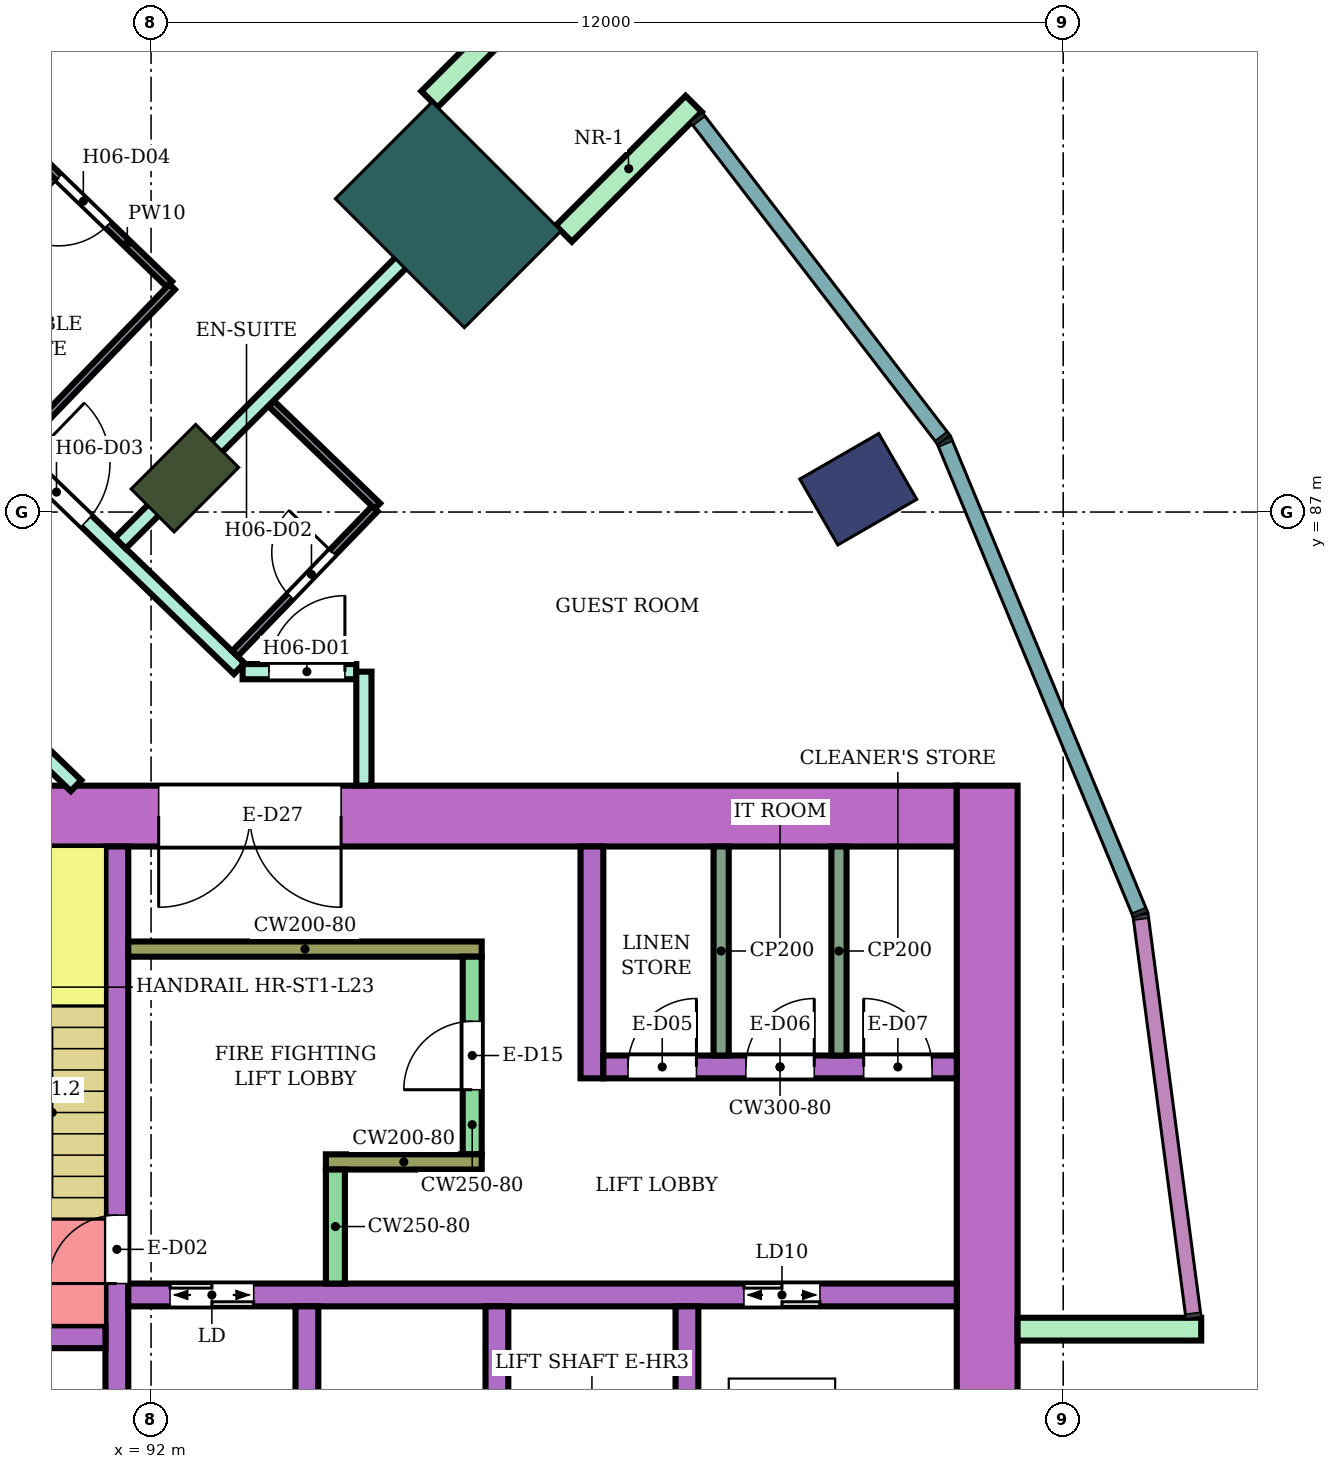
"""IFC4 building model, lengths in metres.
Left out: names, types, materials, properties, quantities, classifications, styles, units other than length and angle.
Written with IfcOpenShell. Run it as: python <this file> out.ifc"""

import sys

from ifc_helpers import new_model, si_unit, direction, frame, frame_2d, origin, origin_2d, place, context, subcontext, project, spatial, rectangle, extrude, element, fill, save


model = new_model("IFC4")
c1 = context("Model", 3, precision=1e-05, world=origin(), true_north=direction((0.0, 1.0)))
c2 = subcontext(c1, "Body", "Model", "MODEL_VIEW")
j1 = project(units=[si_unit("LENGTHUNIT", "METRE"), si_unit("PLANEANGLEUNIT", "RADIAN")], contexts=[c1])
p1 = place(None, origin())
s1 = spatial("IfcSite", under=j1, at=p1, CompositionType="ELEMENT")
p2 = place(p1, origin())
s2 = spatial("IfcBuilding", under=s1, at=p2, CompositionType="ELEMENT")
p3 = place(p2, frame((0.0, 0.0, 101.4)))
s3 = spatial("IfcBuildingStorey", under=s2, at=p3, CompositionType="ELEMENT", Elevation=101.4)
p4 = place(p3, frame((101.304, 87.3, 0.0), z_axis=(0.0, 0.0, 1.0), x_axis=(0.866025403784, 0.5, 0.0)))
e1 = element("IfcColumn", 1, at=p4, inside=s3, PredefinedType="COLUMN", context=c2, shape_type="SweptSolid", body=[
    extrude(rectangle(XDim=1.2, YDim=1.0, at=origin_2d()), origin(), (0.0, 0.0, 1.0), 3.8),
])
p5 = place(p3, frame((92.445, 87.445, 0.0), z_axis=(0.0, 0.0, 1.0), x_axis=(0.707106781187, 0.707106781187, 0.0)))
e2 = element("IfcColumn", 2, at=p5, inside=s3, PredefinedType="COLUMN", context=c2, shape_type="SweptSolid", body=[
    extrude(rectangle(XDim=1.2, YDim=0.8, at=origin_2d()), origin(), (0.0, 0.0, 1.0), 3.8),
])
p6 = place(p3, frame((95.91, 90.91, 0.0), z_axis=(0.0, 0.0, 1.0), x_axis=(0.707106781187, 0.707106781187, 0.0)))
e3 = element("IfcColumn", 3, at=p6, inside=s3, PredefinedType="COLUMN", context=c2, shape_type="SweptSolid", body=[
    extrude(rectangle(XDim=1.8, YDim=2.4, at=origin_2d()), origin(), (0.0, 0.0, 1.0), 3.8),
])
p7 = place(p3, frame((87.9, 83.0, 0.0), z_axis=(0.0, 0.0, 1.0), x_axis=(1.0, 0.0, 0.0)))
e4 = element("IfcWall", 4, at=p7, inside=s3, PredefinedType="SHEAR", context=c2, shape_type="SweptSolid", body=[
    extrude(rectangle(XDim=14.7, YDim=0.8, at=frame_2d((7.35, 0.0))), origin(), (0.0, 0.0, 1.0), 3.48),
])
p8 = place(p7, frame((4.2, 0.0, 0.0)))
e5 = element("IfcOpeningElement", 5, at=p8, cuts=e4, PredefinedType="OPENING", context=c2, shape_type="SweptSolid", body=[
    extrude(rectangle(XDim=2.4, YDim=2.4, at=frame_2d((1.2, 1.2))), frame((0.0, 0.41, 0.0), z_axis=(0.0, -1.0, 0.0), x_axis=(1.0, 0.0, 0.0)), (0.0, 0.0, 1.0), 0.82),
])
p9 = place(p3, frame((103.0, 66.6, 0.0), z_axis=(0.0, 0.0, 1.0), x_axis=(0.0, 1.0, 0.0)))
e6 = element("IfcWall", 6, at=p9, inside=s3, PredefinedType="SHEAR", context=c2, shape_type="SweptSolid", body=[
    extrude(rectangle(XDim=16.8, YDim=0.8, at=frame_2d((8.4, 0.0))), origin(), (0.0, 0.0, 1.0), 3.48),
])
p10 = place(p3, frame((91.55, 75.0, 0.0), z_axis=(0.0, 0.0, 1.0), x_axis=(0.0, 1.0, 0.0)))
e7 = element("IfcWall", 7, at=p10, inside=s3, PredefinedType="SHEAR", context=c2, shape_type="SweptSolid", body=[
    extrude(rectangle(XDim=7.6, YDim=0.3, at=frame_2d((3.8, 0.0))), origin(), (0.0, 0.0, 1.0), 3.48),
])
p11 = place(p10, frame((1.85, 0.0, 0.0)))
e8 = element("IfcOpeningElement", 8, at=p11, cuts=e7, PredefinedType="OPENING", context=c2, shape_type="SweptSolid", body=[
    extrude(rectangle(XDim=0.9, YDim=2.1, at=frame_2d((0.45, 1.05))), frame((0.0, 0.16, 0.0), z_axis=(0.0, -1.0, 0.0), x_axis=(1.0, 0.0, 0.0)), (0.0, 0.0, 1.0), 0.32),
])
p12 = place(p3, frame((88.35, 76.15, 0.0), z_axis=(0.0, 0.0, 1.0), x_axis=(1.0, 0.0, 0.0)))
e9 = element("IfcWall", 9, at=p12, inside=s3, PredefinedType="SHEAR", context=c2, shape_type="SweptSolid", body=[
    extrude(rectangle(XDim=3.05, YDim=0.3, at=frame_2d((1.525, 0.0))), origin(), (0.0, 0.0, 1.0), 3.48),
])
p13 = place(p12, frame((1.1, 0.0, 0.0)))
e10 = element("IfcOpeningElement", 10, at=p13, cuts=e9, PredefinedType="OPENING", context=c2, shape_type="SweptSolid", body=[
    extrude(rectangle(XDim=0.7, YDim=2.0, at=frame_2d((0.35, 1.0))), frame((0.0, 0.16, 0.0), z_axis=(0.0, -1.0, 0.0), x_axis=(1.0, 0.0, 0.0)), (0.0, 0.0, 1.0), 0.32),
])
p14 = place(p3, frame((91.7, 76.7, 0.0), z_axis=(0.0, 0.0, 1.0), x_axis=(1.0, 0.0, 0.0)))
e11 = element("IfcWall", 11, at=p14, inside=s3, PredefinedType="SHEAR", context=c2, shape_type="SweptSolid", body=[
    extrude(rectangle(XDim=10.9, YDim=0.3, at=frame_2d((5.45, 0.0))), origin(), (0.0, 0.0, 1.0), 3.48),
])
p15 = place(p14, frame((0.55, 0.0, 0.0)))
e12 = element("IfcOpeningElement", 12, at=p15, cuts=e11, PredefinedType="OPENING", context=c2, shape_type="SweptSolid", body=[
    extrude(rectangle(XDim=1.1, YDim=2.1, at=frame_2d((0.55, 1.05))), frame((0.0, 0.16, 0.0), z_axis=(0.0, -1.0, 0.0), x_axis=(1.0, 0.0, 0.0)), (0.0, 0.0, 1.0), 0.32),
])
p16 = place(p14, frame((8.1, 0.0, 0.0)))
e13 = element("IfcOpeningElement", 13, at=p16, cuts=e11, PredefinedType="OPENING", context=c2, shape_type="SweptSolid", body=[
    extrude(rectangle(XDim=1.0, YDim=2.1, at=frame_2d((0.5, 1.05))), frame((0.0, 0.16, 0.0), z_axis=(0.0, -1.0, 0.0), x_axis=(1.0, 0.0, 0.0)), (0.0, 0.0, 1.0), 0.32),
])
for number, where, z_axis, x_axis in (
    (14, (94.05, 74.0, 0.0), (0.0, 0.0, 1.0), (0.0, 1.0, 0.0)),
    (15, (96.55, 74.0, 0.0), (0.0, 0.0, 1.0), (0.0, 1.0, 0.0)),
    (16, (99.05, 74.0, 0.0), (0.0, 0.0, 1.0), (0.0, 1.0, 0.0)),
):
    element("IfcWall", number, at=place(p3, frame(where, z_axis=z_axis, x_axis=x_axis)), inside=s3, PredefinedType="SHEAR", context=c2, shape_type="SweptSolid", body=[
        extrude(rectangle(XDim=2.55, YDim=0.3, at=frame_2d((1.275, 0.0))), origin(), (0.0, 0.0, 1.0), 3.48),
    ])
p17 = place(p3, frame((91.7, 81.25, 0.0), z_axis=(0.0, 0.0, 1.0), x_axis=(1.0, 0.0, 0.0)))
e17 = element("IfcWall", 17, at=p17, inside=s3, PredefinedType="SHEAR", context=c2, shape_type="SweptSolid", body=[
    extrude(rectangle(XDim=4.65, YDim=0.2, at=frame_2d((2.325, 0.0))), origin(), (0.0, 0.0, 1.0), 3.48),
])
p18 = place(p3, frame((96.225, 78.55, 0.0), z_axis=(0.0, 0.0, 1.0), x_axis=(0.0, 1.0, 0.0)))
e18 = element("IfcWall", 18, at=p18, inside=s3, PredefinedType="SHEAR", context=c2, shape_type="SweptSolid", body=[
    extrude(rectangle(XDim=2.6, YDim=0.25, at=frame_2d((1.3, 0.0))), origin(), (0.0, 0.0, 1.0), 3.48),
])
p19 = place(p18, frame((0.85, 0.0, 0.0)))
e19 = element("IfcOpeningElement", 19, at=p19, cuts=e18, PredefinedType="OPENING", context=c2, shape_type="SweptSolid", body=[
    extrude(rectangle(XDim=0.9, YDim=2.1, at=frame_2d((0.45, 1.05))), frame((0.0, 0.135, 0.0), z_axis=(0.0, -1.0, 0.0), x_axis=(1.0, 0.0, 0.0)), (0.0, 0.0, 1.0), 0.27),
])
p20 = place(p3, frame((94.3, 78.45, 0.0), z_axis=(0.0, 0.0, 1.0), x_axis=(1.0, 0.0, 0.0)))
e20 = element("IfcWall", 20, at=p20, inside=s3, PredefinedType="SHEAR", context=c2, shape_type="SweptSolid", body=[
    extrude(rectangle(XDim=2.05, YDim=0.2, at=frame_2d((1.025, 0.0))), origin(), (0.0, 0.0, 1.0), 3.48),
])
p21 = place(p3, frame((94.425, 76.85, 0.0), z_axis=(0.0, 0.0, 1.0), x_axis=(0.0, 1.0, 0.0)))
e21 = element("IfcWall", 21, at=p21, inside=s3, PredefinedType="SHEAR", context=c2, shape_type="SweptSolid", body=[
    extrude(rectangle(XDim=1.5, YDim=0.25, at=frame_2d((0.75, 0.0))), origin(), (0.0, 0.0, 1.0), 3.48),
])
p22 = place(p3, frame((97.8, 79.55, 0.0), z_axis=(0.0, 0.0, 1.0), x_axis=(0.0, 1.0, 0.0)))
e22 = element("IfcWall", 22, at=p22, inside=s3, PredefinedType="SHEAR", context=c2, shape_type="SweptSolid", body=[
    extrude(rectangle(XDim=3.05, YDim=0.3, at=frame_2d((1.525, 0.0))), origin(), (0.0, 0.0, 1.0), 3.48),
])
p23 = place(p3, frame((97.95, 79.7, 0.0), z_axis=(0.0, 0.0, 1.0), x_axis=(1.0, 0.0, 0.0)))
e23 = element("IfcWall", 23, at=p23, inside=s3, PredefinedType="SHEAR", context=c2, shape_type="SweptSolid", body=[
    extrude(rectangle(XDim=4.65, YDim=0.3, at=frame_2d((2.325, 0.0))), origin(), (0.0, 0.0, 1.0), 3.48),
])
p24 = place(p23, frame((0.325, 0.0, 0.0)))
e24 = element("IfcOpeningElement", 24, at=p24, cuts=e23, PredefinedType="OPENING", context=c2, shape_type="SweptSolid", body=[
    extrude(rectangle(XDim=0.9, YDim=2.1, at=frame_2d((0.45, 1.05))), frame((0.0, 0.16, 0.0), z_axis=(0.0, -1.0, 0.0), x_axis=(1.0, 0.0, 0.0)), (0.0, 0.0, 1.0), 0.32),
])
p25 = place(p23, frame((1.875, 0.0, 0.0)))
e25 = element("IfcOpeningElement", 25, at=p25, cuts=e23, PredefinedType="OPENING", context=c2, shape_type="SweptSolid", body=[
    extrude(rectangle(XDim=0.9, YDim=2.1, at=frame_2d((0.45, 1.05))), frame((0.0, 0.16, 0.0), z_axis=(0.0, -1.0, 0.0), x_axis=(1.0, 0.0, 0.0)), (0.0, 0.0, 1.0), 0.32),
])
p26 = place(p23, frame((3.425, 0.0, 0.0)))
e26 = element("IfcOpeningElement", 26, at=p26, cuts=e23, PredefinedType="OPENING", context=c2, shape_type="SweptSolid", body=[
    extrude(rectangle(XDim=0.9, YDim=2.1, at=frame_2d((0.45, 1.05))), frame((0.0, 0.16, 0.0), z_axis=(0.0, -1.0, 0.0), x_axis=(1.0, 0.0, 0.0)), (0.0, 0.0, 1.0), 0.32),
])
for number, where, z_axis, x_axis in (
    (27, (103.4, 76.25, 0.0), (0.0, 0.0, 1.0), (1.0, 0.0, 0.0)),
    (28, (97.43, 90.662, 0.0), (0.0, 0.0, 1.0), (0.707, 0.707, 0.0)),
    (29, (95.662, 92.43, 0.0), (0.0, 0.0, 1.0), (0.707, 0.707, 0.0)),
):
    element("IfcWall", number, at=place(p3, frame(where, z_axis=z_axis, x_axis=x_axis)), inside=s3, PredefinedType="NOTDEFINED", context=c2, shape_type="SweptSolid", body=[
        extrude(rectangle(XDim=2.416, YDim=0.3, at=frame_2d((1.208, 0.0))), origin(), (0.0, 0.0, 1.0), 3.8),
    ])
p27 = place(p3, frame((87.064, 87.211, 0.0), z_axis=(0.0, 0.0, 1.0), x_axis=(0.719540958932, -0.694450004262, 0.0)))
e30 = element("IfcWall", 30, at=p27, inside=s3, PredefinedType="PARTITIONING", context=c2, shape_type="SweptSolid", body=[
    extrude(rectangle(XDim=5.488, YDim=0.2, at=frame_2d((2.744, 0.0))), origin(), (0.0, 0.0, 1.0), 3.35),
])
p28 = place(p27, frame((0.55, 0.0, 0.0)))
e31 = element("IfcOpeningElement", 31, at=p28, cuts=e30, PredefinedType="OPENING", context=c2, shape_type="SweptSolid", body=[
    extrude(rectangle(XDim=1.0, YDim=2.1, at=frame_2d((0.5, 1.05))), frame((0.0, 0.11, 0.0), z_axis=(0.0, -1.0, 0.0), x_axis=(1.0, 0.0, 0.0)), (0.0, 0.0, 1.0), 0.22),
])
p29 = place(p3, frame((88.465, 89.473, 0.0), z_axis=(0.0, 0.0, 1.0), x_axis=(0.719474304909, -0.694519059908, 0.0)))
e32 = element("IfcWall", 32, at=p29, inside=s3, PredefinedType="PARTITIONING", context=c2, shape_type="SweptSolid", body=[
    extrude(rectangle(XDim=6.525, YDim=0.2, at=frame_2d((3.263, 0.0))), origin(), (0.0, 0.0, 1.0), 3.35),
])
p30 = place(p29, frame((2.633, 0.0, 0.0)))
e33 = element("IfcOpeningElement", 33, at=p30, cuts=e32, PredefinedType="OPENING", context=c2, shape_type="SweptSolid", body=[
    extrude(rectangle(XDim=1.1, YDim=2.1, at=frame_2d((0.55, 1.05))), frame((0.0, 0.11, 0.0), z_axis=(0.0, -1.0, 0.0), x_axis=(1.0, 0.0, 0.0)), (0.0, 0.0, 1.0), 0.22),
])
p31 = place(p3, frame((88.4, 89.538, 0.0), z_axis=(0.0, 0.0, 1.0), x_axis=(0.500234695877, 0.865889859648, 0.0)))
e34 = element("IfcWall", 34, at=p31, inside=s3, PredefinedType="PARTITIONING", context=c2, shape_type="SweptSolid", body=[
    extrude(rectangle(XDim=9.007, YDim=0.2, at=frame_2d((4.503, 0.0))), origin(), (0.0, 0.0, 1.0), 3.35),
])
p32 = place(p3, frame((91.595, 86.59, 0.0), z_axis=(0.0, 0.0, 1.0), x_axis=(0.707232337591, 0.706981202484, 0.0)))
e35 = element("IfcWall", 35, at=p32, inside=s3, PredefinedType="PARTITIONING", context=c2, shape_type="SweptSolid", body=[
    extrude(rectangle(XDim=6.805, YDim=0.2, at=frame_2d((3.402, 0.0))), origin(), (0.0, 0.0, 1.0), 3.35),
])
p33 = place(p3, frame((93.204, 84.9, 0.0), z_axis=(0.0, 0.0, 1.0), x_axis=(1.0, 0.0, 0.0)))
e36 = element("IfcWall", 36, at=p33, inside=s3, PredefinedType="PARTITIONING", context=c2, shape_type="SweptSolid", body=[
    extrude(rectangle(XDim=1.496, YDim=0.2, at=frame_2d((0.748, 0.0))), origin(), (0.0, 0.0, 1.0), 3.35),
])
p34 = place(p33, frame((0.346, 0.0, 0.0)))
e37 = element("IfcOpeningElement", 37, at=p34, cuts=e36, PredefinedType="OPENING", context=c2, shape_type="SweptSolid", body=[
    extrude(rectangle(XDim=1.0, YDim=2.1, at=frame_2d((0.5, 1.05))), frame((0.0, 0.11, 0.0), z_axis=(0.0, -1.0, 0.0), x_axis=(1.0, 0.0, 0.0)), (0.0, 0.0, 1.0), 0.22),
])
p35 = place(p3, frame((94.8, 83.401, 0.0), z_axis=(0.0, 0.0, 1.0), x_axis=(0.0, 1.0, 0.0)))
e38 = element("IfcWall", 38, at=p35, inside=s3, PredefinedType="PARTITIONING", context=c2, shape_type="SweptSolid", body=[
    extrude(rectangle(XDim=1.499, YDim=0.2, at=frame_2d((0.75, 0.0))), origin(), (0.0, 0.0, 1.0), 3.35),
])
p36 = place(p3, frame((90.027, 92.134, 0.0), z_axis=(0.0, 0.0, 1.0), x_axis=(0.719415132118, -0.694580353652, 0.0)))
e39 = element("IfcWall", 39, at=p36, inside=s3, PredefinedType="PARTITIONING", context=c2, shape_type="SweptSolid", body=[
    extrude(rectangle(XDim=3.077, YDim=0.1, at=frame_2d((1.539, 0.0))), origin(), (0.0, 0.0, 1.0), 3.35),
])
p37 = place(p36, frame((1.053, 0.0, 0.0)))
e40 = element("IfcOpeningElement", 40, at=p37, cuts=e39, PredefinedType="OPENING", context=c2, shape_type="SweptSolid", body=[
    extrude(rectangle(XDim=0.9, YDim=2.1, at=frame_2d((0.45, 1.05))), frame((0.0, 0.06, 0.0), z_axis=(0.0, -1.0, 0.0), x_axis=(1.0, 0.0, 0.0)), (0.0, 0.0, 1.0), 0.12),
])
p38 = place(p3, frame((90.263, 87.876, 0.0), z_axis=(0.0, 0.0, 1.0), x_axis=(0.694534400859, 0.719459495749, 0.0)))
e41 = element("IfcWall", 41, at=p38, inside=s3, PredefinedType="PARTITIONING", context=c2, shape_type="SweptSolid", body=[
    extrude(rectangle(XDim=2.899, YDim=0.1, at=frame_2d((1.45, 0.0))), origin(), (0.0, 0.0, 1.0), 3.35),
])
p39 = place(p3, frame((93.104, 85.136, 0.0), z_axis=(0.0, 0.0, 1.0), x_axis=(0.694324808789, 0.719661767708, 0.0)))
e42 = element("IfcWall", 42, at=p39, inside=s3, PredefinedType="PARTITIONING", context=c2, shape_type="SweptSolid", body=[
    extrude(rectangle(XDim=2.65, YDim=0.1, at=frame_2d((1.325, 0.0))), origin(), (0.0, 0.0, 1.0), 3.35),
])
p40 = place(p39, frame((1.05, 0.0, 0.0)))
e43 = element("IfcOpeningElement", 43, at=p40, cuts=e42, PredefinedType="OPENING", context=c2, shape_type="SweptSolid", body=[
    extrude(rectangle(XDim=0.8, YDim=2.1, at=frame_2d((0.4, 1.05))), frame((0.0, 0.06, 0.0), z_axis=(0.0, -1.0, 0.0), x_axis=(1.0, 0.0, 0.0)), (0.0, 0.0, 1.0), 0.12),
])
p41 = place(p3, frame((93.582, 88.426, 0.0), z_axis=(0.0, 0.0, 1.0), x_axis=(0.719707242969, -0.694277670977, 0.0)))
e44 = element("IfcWall", 44, at=p41, inside=s3, PredefinedType="PARTITIONING", context=c2, shape_type="SweptSolid", body=[
    extrude(rectangle(XDim=1.939, YDim=0.1, at=frame_2d((0.97, 0.0))), origin(), (0.0, 0.0, 1.0), 3.35),
])
for number, where, z_axis, x_axis in (
    (45, (99.5, 79.85, 0.0), (0.0, 0.0, 1.0), (0.0, 1.0, 0.0)),
    (46, (101.05, 79.85, 0.0), (0.0, 0.0, 1.0), (0.0, 1.0, 0.0)),
):
    element("IfcWall", number, at=place(p3, frame(where, z_axis=z_axis, x_axis=x_axis)), inside=s3, PredefinedType="PARTITIONING", context=c2, shape_type="SweptSolid", body=[
        extrude(rectangle(XDim=2.75, YDim=0.2, at=frame_2d((1.375, 0.0))), origin(), (0.0, 0.0, 1.0), 3.48),
    ])
p42 = place(p34, origin())
e47 = element("IfcDoor", 47, at=p42, inside=s3, OperationType="SINGLE_SWING_RIGHT", PredefinedType="DOOR", context=c2, shape_type="SweptSolid", body=[
    extrude(rectangle(XDim=1.0, YDim=2.1, at=frame_2d((0.5, 1.05))), frame((0.0, 0.025, 0.0), z_axis=(0.0, -1.0, 0.0), x_axis=(1.0, 0.0, 0.0)), (0.0, 0.0, 1.0), 0.05),
])
fill(e37, e47)
p43 = place(p40, origin())
e48 = element("IfcDoor", 48, at=p43, inside=s3, OperationType="SINGLE_SWING_RIGHT", PredefinedType="DOOR", context=c2, shape_type="SweptSolid", body=[
    extrude(rectangle(XDim=0.8, YDim=2.1, at=frame_2d((0.4, 1.05))), frame((0.0, 0.025, 0.0), z_axis=(0.0, -1.0, 0.0), x_axis=(1.0, 0.0, 0.0)), (0.0, 0.0, 1.0), 0.05),
])
fill(e43, e48)
p44 = place(p30, origin())
e49 = element("IfcDoor", 49, at=p44, inside=s3, OperationType="SINGLE_SWING_LEFT", PredefinedType="DOOR", context=c2, shape_type="SweptSolid", body=[
    extrude(rectangle(XDim=1.1, YDim=2.1, at=frame_2d((0.55, 1.05))), frame((0.0, 0.025, 0.0), z_axis=(0.0, -1.0, 0.0), x_axis=(1.0, 0.0, 0.0)), (0.0, 0.0, 1.0), 0.05),
])
fill(e33, e49)
p45 = place(p37, frame((0.9, 0.0, 0.0), z_axis=(0.0, 0.0, 1.0), x_axis=(-1.0, 0.0, 0.0)))
e50 = element("IfcDoor", 50, at=p45, inside=s3, OperationType="SINGLE_SWING_RIGHT", PredefinedType="DOOR", context=c2, shape_type="SweptSolid", body=[
    extrude(rectangle(XDim=0.9, YDim=2.1, at=frame_2d((0.45, 1.05))), frame((0.0, 0.025, 0.0), z_axis=(0.0, -1.0, 0.0), x_axis=(1.0, 0.0, 0.0)), (0.0, 0.0, 1.0), 0.05),
])
fill(e40, e50)
p46 = place(p11, origin())
e51 = element("IfcDoor", 51, at=p46, inside=s3, OperationType="SINGLE_SWING_LEFT", PredefinedType="DOOR", context=c2, shape_type="SweptSolid", body=[
    extrude(rectangle(XDim=0.9, YDim=2.1, at=frame_2d((0.45, 1.05))), frame((0.0, 0.025, 0.0), z_axis=(0.0, -1.0, 0.0), x_axis=(1.0, 0.0, 0.0)), (0.0, 0.0, 1.0), 0.05),
])
fill(e8, e51)
p47 = place(p15, origin())
e52 = element("IfcDoor", 52, at=p47, inside=s3, OperationType="DOUBLE_DOOR_SLIDING", PredefinedType="DOOR", context=c2, shape_type="SweptSolid", body=[
    extrude(rectangle(XDim=1.1, YDim=2.1, at=frame_2d((0.55, 1.05))), frame((0.0, 0.025, 0.0), z_axis=(0.0, -1.0, 0.0), x_axis=(1.0, 0.0, 0.0)), (0.0, 0.0, 1.0), 0.05),
])
fill(e12, e52)
p48 = place(p16, origin())
e53 = element("IfcDoor", 53, at=p48, inside=s3, OperationType="DOUBLE_DOOR_SLIDING", PredefinedType="DOOR", context=c2, shape_type="SweptSolid", body=[
    extrude(rectangle(XDim=1.0, YDim=2.1, at=frame_2d((0.5, 1.05))), frame((0.0, 0.025, 0.0), z_axis=(0.0, -1.0, 0.0), x_axis=(1.0, 0.0, 0.0)), (0.0, 0.0, 1.0), 0.05),
])
fill(e13, e53)
p49 = place(p19, origin())
e54 = element("IfcDoor", 54, at=p49, inside=s3, OperationType="SINGLE_SWING_LEFT", PredefinedType="DOOR", context=c2, shape_type="SweptSolid", body=[
    extrude(rectangle(XDim=0.9, YDim=2.1, at=frame_2d((0.45, 1.05))), frame((0.0, 0.025, 0.0), z_axis=(0.0, -1.0, 0.0), x_axis=(1.0, 0.0, 0.0)), (0.0, 0.0, 1.0), 0.05),
])
fill(e19, e54)
p50 = place(p24, origin())
e55 = element("IfcDoor", 55, at=p50, inside=s3, OperationType="SINGLE_SWING_RIGHT", PredefinedType="DOOR", context=c2, shape_type="SweptSolid", body=[
    extrude(rectangle(XDim=0.9, YDim=2.1, at=frame_2d((0.45, 1.05))), frame((0.0, 0.025, 0.0), z_axis=(0.0, -1.0, 0.0), x_axis=(1.0, 0.0, 0.0)), (0.0, 0.0, 1.0), 0.05),
])
fill(e24, e55)
p51 = place(p25, origin())
e56 = element("IfcDoor", 56, at=p51, inside=s3, OperationType="SINGLE_SWING_RIGHT", PredefinedType="DOOR", context=c2, shape_type="SweptSolid", body=[
    extrude(rectangle(XDim=0.9, YDim=2.1, at=frame_2d((0.45, 1.05))), frame((0.0, 0.025, 0.0), z_axis=(0.0, -1.0, 0.0), x_axis=(1.0, 0.0, 0.0)), (0.0, 0.0, 1.0), 0.05),
])
fill(e25, e56)
p52 = place(p26, origin())
e57 = element("IfcDoor", 57, at=p52, inside=s3, OperationType="SINGLE_SWING_LEFT", PredefinedType="DOOR", context=c2, shape_type="SweptSolid", body=[
    extrude(rectangle(XDim=0.9, YDim=2.1, at=frame_2d((0.45, 1.05))), frame((0.0, 0.025, 0.0), z_axis=(0.0, -1.0, 0.0), x_axis=(1.0, 0.0, 0.0)), (0.0, 0.0, 1.0), 0.05),
])
fill(e26, e57)
p53 = place(p8, frame((2.4, 0.0, 0.0), z_axis=(0.0, 0.0, 1.0), x_axis=(-1.0, 0.0, 0.0)))
e58 = element("IfcDoor", 58, at=p53, inside=s3, OperationType="DOUBLE_DOOR_SINGLE_SWING", PredefinedType="DOOR", context=c2, shape_type="SweptSolid", body=[
    extrude(rectangle(XDim=2.4, YDim=2.4, at=frame_2d((1.2, 1.2))), frame((0.0, 0.025, 0.0), z_axis=(0.0, -1.0, 0.0), x_axis=(1.0, 0.0, 0.0)), (0.0, 0.0, 1.0), 0.05),
])
fill(e5, e58)
save(model, sys.argv[1])
